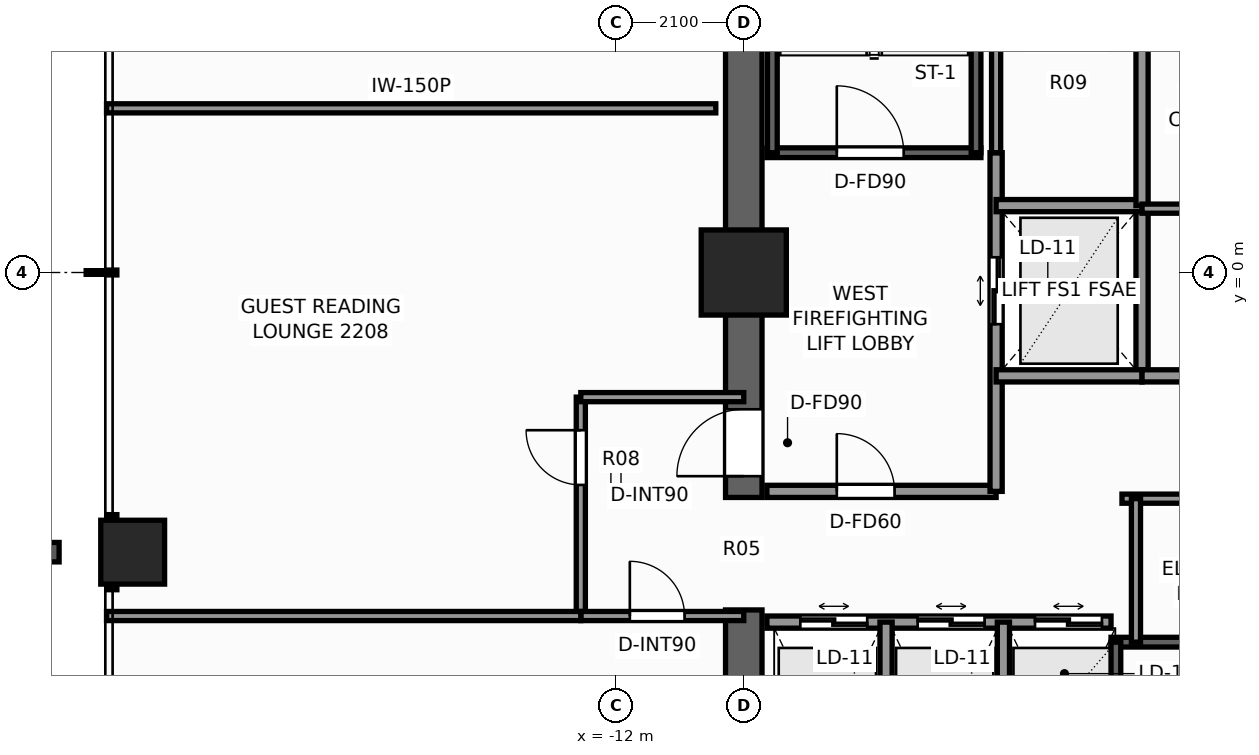
"""IFC4 building model, lengths in metres.
Left out: names, types, materials, properties, quantities, classifications, styles, units other than length and angle.
Written with IfcOpenShell. Run it as: python <this file> out.ifc"""

import sys

from ifc_helpers import new_model, si_unit, direction, frame, frame_2d, origin, origin_2d, place, context, subcontext, project, spatial, rectangle, extrude, element, fill, save


model = new_model("IFC4")
c1 = context("Model", 3, precision=1e-05, world=origin(), true_north=direction((0.0, 1.0)))
c2 = subcontext(c1, "Body", "Model", "MODEL_VIEW")
j1 = project(units=[si_unit("LENGTHUNIT", "METRE"), si_unit("PLANEANGLEUNIT", "RADIAN")], contexts=[c1])
p1 = place(None, origin())
s1 = spatial("IfcSite", under=j1, at=p1, CompositionType="ELEMENT")
p2 = place(p1, origin())
s2 = spatial("IfcBuilding", under=s1, at=p2, CompositionType="ELEMENT")
p3 = place(p2, frame((0.0, 0.0, 78.8)))
s3 = spatial("IfcBuildingStorey", under=s2, at=p3, CompositionType="ELEMENT", Elevation=78.8)
p4 = place(p3, frame((-9.9, -9.6, 0.0), z_axis=(0.0, 0.0, 1.0), x_axis=(0.0, 1.0, 0.0)))
e1 = element("IfcWall", 1, at=p4, inside=s3, PredefinedType="SHEAR", context=c2, shape_type="SweptSolid", body=[
    extrude(rectangle(XDim=4.05, YDim=0.6, at=frame_2d((2.025, 0.0))), origin(), (0.0, 0.0, 1.0), 3.3),
])
p5 = place(p3, frame((-9.9, -3.7, 0.0), z_axis=(0.0, 0.0, 1.0), x_axis=(0.0, 1.0, 0.0)))
e2 = element("IfcWall", 2, at=p5, inside=s3, PredefinedType="SHEAR", context=c2, shape_type="SweptSolid", body=[
    extrude(rectangle(XDim=13.3, YDim=0.6, at=frame_2d((6.65, 0.0))), origin(), (0.0, 0.0, 1.0), 3.3),
])
p6 = place(p5, frame((0.35, 0.0, 0.0)))
e3 = element("IfcOpeningElement", 3, at=p6, cuts=e2, PredefinedType="OPENING", context=c2, shape_type="SweptSolid", body=[
    extrude(rectangle(XDim=1.1, YDim=2.2, at=frame_2d((0.55, 1.1))), frame((0.0, 0.31, 0.0), z_axis=(0.0, -1.0, 0.0), x_axis=(1.0, 0.0, 0.0)), (0.0, 0.0, 1.0), 0.62),
])
p7 = place(p3, frame((-9.9, 0.0, 0.0), z_axis=(0.0, 0.0, 1.0), x_axis=(1.0, 0.0, 0.0)))
e4 = element("IfcColumn", 4, at=p7, inside=s3, PredefinedType="COLUMN", context=c2, shape_type="SweptSolid", body=[
    extrude(rectangle(XDim=1.4, YDim=1.4, at=origin_2d()), origin(), (0.0, 0.0, 1.0), 3.3),
])
p8 = place(p3, frame((-19.95, -4.6, 0.0), z_axis=(0.0, 0.0, 1.0), x_axis=(1.0, 0.0, 0.0)))
e5 = element("IfcColumn", 5, at=p8, inside=s3, PredefinedType="COLUMN", context=c2, shape_type="SweptSolid", body=[
    extrude(rectangle(XDim=1.05, YDim=1.05, at=origin_2d()), origin(), (0.0, 0.0, 1.0), 3.3),
])
p9 = place(p3, frame((-9.52, 1.97, 0.0), z_axis=(0.0, 0.0, 1.0), x_axis=(1.0, 0.0, 0.0)))
e6 = element("IfcWall", 6, at=p9, inside=s3, PredefinedType="SHEAR", context=c2, shape_type="SweptSolid", body=[
    extrude(rectangle(XDim=3.52, YDim=0.16, at=frame_2d((1.76, 0.0))), origin(), (0.0, 0.0, 1.0), 3.3),
])
p10 = place(p9, frame((1.15, 0.0, 0.0)))
e7 = element("IfcOpeningElement", 7, at=p10, cuts=e6, PredefinedType="OPENING", context=c2, shape_type="SweptSolid", body=[
    extrude(rectangle(XDim=1.1, YDim=2.2, at=frame_2d((0.55, 1.1))), frame((0.0, 0.09, 0.0), z_axis=(0.0, -1.0, 0.0), x_axis=(1.0, 0.0, 0.0)), (0.0, 0.0, 1.0), 0.18),
])
for number, where, z_axis, x_axis in (
    (8, (-9.43, 1.97, 0.0), (0.0, 0.0, 1.0), (0.0, 1.0, 0.0)),
    (9, (-6.08, 1.97, 0.0), (0.0, 0.0, 1.0), (0.0, 1.0, 0.0)),
):
    element("IfcWall", number, at=place(p3, frame(where, z_axis=z_axis, x_axis=x_axis)), inside=s3, PredefinedType="SHEAR", context=c2, shape_type="SweptSolid", body=[
        extrude(rectangle(XDim=7.56, YDim=0.16, at=frame_2d((3.78, 0.0))), origin(), (0.0, 0.0, 1.0), 3.3),
    ])
p11 = place(p3, frame((-3.86, -6.08, 0.0), z_axis=(0.0, 0.0, 1.0), x_axis=(1.0, 0.0, 0.0)))
e10 = element("IfcWall", 10, at=p11, inside=s3, PredefinedType="SHEAR", context=c2, shape_type="SweptSolid", body=[
    extrude(rectangle(XDim=7.72, YDim=0.16, at=frame_2d((3.86, 0.0))), origin(), (0.0, 0.0, 1.0), 3.3),
])
p12 = place(p3, frame((-3.78, -9.43, 0.0), z_axis=(0.0, 0.0, 1.0), x_axis=(0.0, 1.0, 0.0)))
e11 = element("IfcWall", 11, at=p12, inside=s3, PredefinedType="SHEAR", context=c2, shape_type="SweptSolid", body=[
    extrude(rectangle(XDim=3.35, YDim=0.16, at=frame_2d((1.675, 0.0))), origin(), (0.0, 0.0, 1.0), 3.3),
])
p13 = place(p3, frame((-9.52, -3.6, 0.0), z_axis=(0.0, 0.0, 1.0), x_axis=(1.0, 0.0, 0.0)))
e12 = element("IfcWall", 12, at=p13, inside=s3, PredefinedType="SOLIDWALL", context=c2, shape_type="SweptSolid", body=[
    extrude(rectangle(XDim=3.77, YDim=0.2, at=frame_2d((1.885, 0.0))), origin(), (0.0, 0.0, 1.0), 3.08),
])
p14 = place(p13, frame((1.15, 0.0, 0.0)))
e13 = element("IfcOpeningElement", 13, at=p14, cuts=e12, PredefinedType="OPENING", context=c2, shape_type="SweptSolid", body=[
    extrude(rectangle(XDim=0.95, YDim=2.06, at=frame_2d((0.475, 1.03))), frame((0.0, 0.11, 0.0), z_axis=(0.0, -1.0, 0.0), x_axis=(1.0, 0.0, 0.0)), (0.0, 0.0, 1.0), 0.22),
])
p15 = place(p3, frame((-5.75, -3.6, 0.0), z_axis=(0.0, 0.0, 1.0), x_axis=(0.0, 1.0, 0.0)))
e14 = element("IfcWall", 14, at=p15, inside=s3, PredefinedType="SOLIDWALL", context=c2, shape_type="SweptSolid", body=[
    extrude(rectangle(XDim=5.57, YDim=0.2, at=frame_2d((2.785, 0.0))), origin(), (0.0, 0.0, 1.0), 3.08),
])
p16 = place(p15, frame((2.75, 0.0, 0.0)))
e15 = element("IfcOpeningElement", 15, at=p16, cuts=e14, PredefinedType="OPENING", context=c2, shape_type="SweptSolid", body=[
    extrude(rectangle(XDim=1.1, YDim=2.2, at=frame_2d((0.55, 1.1))), frame((0.0, 0.11, 0.0), z_axis=(0.0, -1.0, 0.0), x_axis=(1.0, 0.0, 0.0)), (0.0, 0.0, 1.0), 0.22),
])
p17 = place(p3, frame((-3.35, -1.7, 0.0), z_axis=(0.0, 0.0, 1.0), x_axis=(0.0, 1.0, 0.0)))
e16 = element("IfcWall", 16, at=p17, inside=s3, PredefinedType="SOLIDWALL", context=c2, shape_type="SweptSolid", body=[
    extrude(rectangle(XDim=2.8, YDim=0.2, at=frame_2d((1.4, 0.0))), origin(), (0.0, 0.0, 1.0), 3.08),
])
for number, where, z_axis, x_axis in (
    (17, (-5.75, -1.7, 0.0), (0.0, 0.0, 1.0), (1.0, 0.0, 0.0)),
    (18, (-5.75, 1.1, 0.0), (0.0, 0.0, 1.0), (1.0, 0.0, 0.0)),
):
    element("IfcWall", number, at=place(p3, frame(where, z_axis=z_axis, x_axis=x_axis)), inside=s3, PredefinedType="SOLIDWALL", context=c2, shape_type="SweptSolid", body=[
        extrude(rectangle(XDim=2.4, YDim=0.2, at=frame_2d((1.2, 0.0))), origin(), (0.0, 0.0, 1.0), 3.08),
    ])
p18 = place(p3, frame((-9.52, -5.75, 0.0), z_axis=(0.0, 0.0, 1.0), x_axis=(1.0, 0.0, 0.0)))
e19 = element("IfcWall", 19, at=p18, inside=s3, PredefinedType="SOLIDWALL", context=c2, shape_type="SweptSolid", body=[
    extrude(rectangle(XDim=5.66, YDim=0.2, at=frame_2d((2.83, 0.0))), origin(), (0.0, 0.0, 1.0), 3.08),
])
p19 = place(p18, frame((0.55, 0.0, 0.0)))
e20 = element("IfcOpeningElement", 20, at=p19, cuts=e19, PredefinedType="OPENING", context=c2, shape_type="SweptSolid", body=[
    extrude(rectangle(XDim=1.1, YDim=2.2, at=frame_2d((0.55, 1.1))), frame((0.0, 0.11, 0.0), z_axis=(0.0, -1.0, 0.0), x_axis=(1.0, 0.0, 0.0)), (0.0, 0.0, 1.0), 0.22),
])
p20 = place(p18, frame((2.48, 0.0, 0.0)))
e21 = element("IfcOpeningElement", 21, at=p20, cuts=e19, PredefinedType="OPENING", context=c2, shape_type="SweptSolid", body=[
    extrude(rectangle(XDim=1.1, YDim=2.2, at=frame_2d((0.55, 1.1))), frame((0.0, 0.11, 0.0), z_axis=(0.0, -1.0, 0.0), x_axis=(1.0, 0.0, 0.0)), (0.0, 0.0, 1.0), 0.22),
])
p21 = place(p18, frame((4.41, 0.0, 0.0)))
e22 = element("IfcOpeningElement", 22, at=p21, cuts=e19, PredefinedType="OPENING", context=c2, shape_type="SweptSolid", body=[
    extrude(rectangle(XDim=1.1, YDim=2.2, at=frame_2d((0.55, 1.1))), frame((0.0, 0.11, 0.0), z_axis=(0.0, -1.0, 0.0), x_axis=(1.0, 0.0, 0.0)), (0.0, 0.0, 1.0), 0.22),
])
for number, where, z_axis, x_axis in (
    (23, (-7.56, -9.52, 0.0), (0.0, 0.0, 1.0), (0.0, 1.0, 0.0)),
    (24, (-5.63, -9.52, 0.0), (0.0, 0.0, 1.0), (0.0, 1.0, 0.0)),
):
    element("IfcWall", number, at=place(p3, frame(where, z_axis=z_axis, x_axis=x_axis)), inside=s3, PredefinedType="SOLIDWALL", context=c2, shape_type="SweptSolid", body=[
        extrude(rectangle(XDim=3.77, YDim=0.2, at=frame_2d((1.885, 0.0))), origin(), (0.0, 0.0, 1.0), 3.08),
    ])
p22 = place(p3, frame((-3.35, -1.7, 0.0), z_axis=(0.0, 0.0, 1.0), x_axis=(1.0, 0.0, 0.0)))
e25 = element("IfcWall", 25, at=p22, inside=s3, PredefinedType="SOLIDWALL", context=c2, shape_type="SweptSolid", body=[
    extrude(rectangle(XDim=6.7, YDim=0.2, at=frame_2d((3.35, 0.0))), origin(), (0.0, 0.0, 1.0), 3.08),
])
p23 = place(p3, frame((-3.35, 1.1, 0.0), z_axis=(0.0, 0.0, 1.0), x_axis=(0.0, 1.0, 0.0)))
e26 = element("IfcWall", 26, at=p23, inside=s3, PredefinedType="SOLIDWALL", context=c2, shape_type="SweptSolid", body=[
    extrude(rectangle(XDim=3.2, YDim=0.2, at=frame_2d((1.6, 0.0))), origin(), (0.0, 0.0, 1.0), 3.08),
])
p24 = place(p3, frame((-3.35, 1.05, 0.0), z_axis=(0.0, 0.0, 1.0), x_axis=(1.0, 0.0, 0.0)))
e27 = element("IfcWall", 27, at=p24, inside=s3, PredefinedType="PARTITIONING", context=c2, shape_type="SweptSolid", body=[
    extrude(rectangle(XDim=6.7, YDim=0.15, at=frame_2d((3.35, 0.0))), origin(), (0.0, 0.0, 1.0), 3.08),
])
p25 = place(p24, frame((4.2, 0.0, 0.0)))
e28 = element("IfcOpeningElement", 28, at=p25, cuts=e27, PredefinedType="OPENING", context=c2, shape_type="SweptSolid", body=[
    extrude(rectangle(XDim=0.85, YDim=2.03, at=frame_2d((0.425, 1.015))), frame((0.0, 0.085, 0.0), z_axis=(0.0, -1.0, 0.0), x_axis=(1.0, 0.0, 0.0)), (0.0, 0.0, 1.0), 0.17),
])
p26 = place(p3, frame((-3.68, -3.72, 0.0), z_axis=(0.0, 0.0, 1.0), x_axis=(1.0, 0.0, 0.0)))
e29 = element("IfcWall", 29, at=p26, inside=s3, PredefinedType="PARTITIONING", context=c2, shape_type="SweptSolid", body=[
    extrude(rectangle(XDim=7.36, YDim=0.15, at=frame_2d((3.68, 0.0))), origin(), (0.0, 0.0, 1.0), 3.08),
])
p27 = place(p3, frame((-3.45, -6.08, 0.0), z_axis=(0.0, 0.0, 1.0), x_axis=(0.0, 1.0, 0.0)))
e30 = element("IfcWall", 30, at=p27, inside=s3, PredefinedType="PARTITIONING", context=c2, shape_type="SweptSolid", body=[
    extrude(rectangle(XDim=2.36, YDim=0.15, at=frame_2d((1.18, 0.0))), origin(), (0.0, 0.0, 1.0), 3.08),
])
p28 = place(p3, frame((-5.75, 1.97, 0.0), z_axis=(0.0, 0.0, 1.0), x_axis=(0.0, 1.0, 0.0)))
e31 = element("IfcWall", 31, at=p28, inside=s3, PredefinedType="PARTITIONING", context=c2, shape_type="SweptSolid", body=[
    extrude(rectangle(XDim=2.33, YDim=0.15, at=frame_2d((1.165, 0.0))), origin(), (0.0, 0.0, 1.0), 3.08),
])
p29 = place(p3, frame((-12.58, -5.65, 0.0), z_axis=(0.0, 0.0, 1.0), x_axis=(0.0, 1.0, 0.0)))
e32 = element("IfcWall", 32, at=p29, inside=s3, PredefinedType="PARTITIONING", context=c2, shape_type="SweptSolid", body=[
    extrude(rectangle(XDim=3.6, YDim=0.15, at=frame_2d((1.8, 0.0))), origin(), (0.0, 0.0, 1.0), 2.292),
])
p30 = place(p29, frame((2.156, 0.0, 0.0)))
e33 = element("IfcOpeningElement", 33, at=p30, cuts=e32, PredefinedType="OPENING", context=c2, shape_type="SweptSolid", body=[
    extrude(rectangle(XDim=0.9, YDim=2.06, at=frame_2d((0.45, 1.03))), frame((0.0, 0.085, 0.0), z_axis=(0.0, -1.0, 0.0), x_axis=(1.0, 0.0, 0.0)), (0.0, 0.0, 1.0), 0.17),
])
p31 = place(p3, frame((-12.58, -2.05, 0.0), z_axis=(0.0, 0.0, 1.0), x_axis=(1.0, 0.0, 0.0)))
e34 = element("IfcWall", 34, at=p31, inside=s3, PredefinedType="PARTITIONING", context=c2, shape_type="SweptSolid", body=[
    extrude(rectangle(XDim=2.68, YDim=0.15, at=frame_2d((1.34, 0.0))), origin(), (0.0, 0.0, 1.0), 3.08),
])
p32 = place(p3, frame((-12.58, -5.65, 0.0), z_axis=(0.0, 0.0, 1.0), x_axis=(1.0, 0.0, 0.0)))
e35 = element("IfcWall", 35, at=p32, inside=s3, PredefinedType="PARTITIONING", context=c2, shape_type="SweptSolid", body=[
    extrude(rectangle(XDim=2.68, YDim=0.15, at=frame_2d((1.34, 0.0))), origin(), (0.0, 0.0, 1.0), 3.08),
])
p33 = place(p32, frame((0.806, 0.0, 0.0)))
e36 = element("IfcOpeningElement", 36, at=p33, cuts=e35, PredefinedType="OPENING", context=c2, shape_type="SweptSolid", body=[
    extrude(rectangle(XDim=0.9, YDim=2.06, at=frame_2d((0.45, 1.03))), frame((0.0, 0.085, 0.0), z_axis=(0.0, -1.0, 0.0), x_axis=(1.0, 0.0, 0.0)), (0.0, 0.0, 1.0), 0.17),
])
p34 = place(p3, frame((-20.38, 2.7, 0.0), z_axis=(0.0, 0.0, 1.0), x_axis=(1.0, 0.0, 0.0)))
e37 = element("IfcWall", 37, at=p34, inside=s3, PredefinedType="PARTITIONING", context=c2, shape_type="SweptSolid", body=[
    extrude(rectangle(XDim=10.02, YDim=0.15, at=frame_2d((5.01, 0.0))), origin(), (0.0, 0.0, 1.0), 2.449),
])
p35 = place(p3, frame((-20.38, -5.65, 0.0), z_axis=(0.0, 0.0, 1.0), x_axis=(1.0, 0.0, 0.0)))
e38 = element("IfcWall", 38, at=p35, inside=s3, PredefinedType="PARTITIONING", context=c2, shape_type="SweptSolid", body=[
    extrude(rectangle(XDim=7.8, YDim=0.15, at=frame_2d((3.9, 0.0))), origin(), (0.0, 0.0, 1.0), 2.449),
])
p36 = place(p10, origin())
e39 = element("IfcDoor", 39, at=p36, inside=s3, OperationType="SINGLE_SWING_LEFT", PredefinedType="DOOR", context=c2, shape_type="SweptSolid", body=[
    extrude(rectangle(XDim=1.1, YDim=2.2, at=frame_2d((0.55, 1.1))), frame((0.0, 0.025, 0.0), z_axis=(0.0, -1.0, 0.0), x_axis=(1.0, 0.0, 0.0)), (0.0, 0.0, 1.0), 0.05),
])
fill(e7, e39)
p37 = place(p6, origin())
e40 = element("IfcDoor", 40, at=p37, inside=s3, OperationType="SINGLE_SWING_LEFT", PredefinedType="DOOR", context=c2, shape_type="SweptSolid", body=[
    extrude(rectangle(XDim=1.1, YDim=2.2, at=frame_2d((0.55, 1.1))), frame((0.0, 0.025, 0.0), z_axis=(0.0, -1.0, 0.0), x_axis=(1.0, 0.0, 0.0)), (0.0, 0.0, 1.0), 0.05),
])
fill(e3, e40)
p38 = place(p16, origin())
e41 = element("IfcDoor", 41, at=p38, inside=s3, OperationType="DOUBLE_DOOR_SLIDING", PredefinedType="DOOR", context=c2, shape_type="SweptSolid", body=[
    extrude(rectangle(XDim=1.1, YDim=2.2, at=frame_2d((0.55, 1.1))), frame((0.0, 0.025, 0.0), z_axis=(0.0, -1.0, 0.0), x_axis=(1.0, 0.0, 0.0)), (0.0, 0.0, 1.0), 0.05),
])
fill(e15, e41)
p39 = place(p19, origin())
e42 = element("IfcDoor", 42, at=p39, inside=s3, OperationType="DOUBLE_DOOR_SLIDING", PredefinedType="DOOR", context=c2, shape_type="SweptSolid", body=[
    extrude(rectangle(XDim=1.1, YDim=2.2, at=frame_2d((0.55, 1.1))), frame((0.0, 0.025, 0.0), z_axis=(0.0, -1.0, 0.0), x_axis=(1.0, 0.0, 0.0)), (0.0, 0.0, 1.0), 0.05),
])
fill(e20, e42)
p40 = place(p20, origin())
e43 = element("IfcDoor", 43, at=p40, inside=s3, OperationType="DOUBLE_DOOR_SLIDING", PredefinedType="DOOR", context=c2, shape_type="SweptSolid", body=[
    extrude(rectangle(XDim=1.1, YDim=2.2, at=frame_2d((0.55, 1.1))), frame((0.0, 0.025, 0.0), z_axis=(0.0, -1.0, 0.0), x_axis=(1.0, 0.0, 0.0)), (0.0, 0.0, 1.0), 0.05),
])
fill(e21, e43)
p41 = place(p21, origin())
e44 = element("IfcDoor", 44, at=p41, inside=s3, OperationType="DOUBLE_DOOR_SLIDING", PredefinedType="DOOR", context=c2, shape_type="SweptSolid", body=[
    extrude(rectangle(XDim=1.1, YDim=2.2, at=frame_2d((0.55, 1.1))), frame((0.0, 0.025, 0.0), z_axis=(0.0, -1.0, 0.0), x_axis=(1.0, 0.0, 0.0)), (0.0, 0.0, 1.0), 0.05),
])
fill(e22, e44)
p42 = place(p14, origin())
e45 = element("IfcDoor", 45, at=p42, inside=s3, OperationType="SINGLE_SWING_LEFT", PredefinedType="DOOR", context=c2, shape_type="SweptSolid", body=[
    extrude(rectangle(XDim=0.95, YDim=2.06, at=frame_2d((0.475, 1.03))), frame((0.0, 0.025, 0.0), z_axis=(0.0, -1.0, 0.0), x_axis=(1.0, 0.0, 0.0)), (0.0, 0.0, 1.0), 0.05),
])
fill(e13, e45)
p43 = place(p30, origin())
e46 = element("IfcDoor", 46, at=p43, inside=s3, OperationType="SINGLE_SWING_RIGHT", PredefinedType="DOOR", context=c2, shape_type="SweptSolid", body=[
    extrude(rectangle(XDim=0.9, YDim=2.06, at=frame_2d((0.45, 1.03))), frame((0.0, 0.025, 0.0), z_axis=(0.0, -1.0, 0.0), x_axis=(1.0, 0.0, 0.0)), (0.0, 0.0, 1.0), 0.05),
])
fill(e33, e46)
p44 = place(p33, origin())
e47 = element("IfcDoor", 47, at=p44, inside=s3, OperationType="SINGLE_SWING_LEFT", PredefinedType="DOOR", context=c2, shape_type="SweptSolid", body=[
    extrude(rectangle(XDim=0.9, YDim=2.06, at=frame_2d((0.45, 1.03))), frame((0.0, 0.025, 0.0), z_axis=(0.0, -1.0, 0.0), x_axis=(1.0, 0.0, 0.0)), (0.0, 0.0, 1.0), 0.05),
])
fill(e36, e47)
save(model, sys.argv[1])
